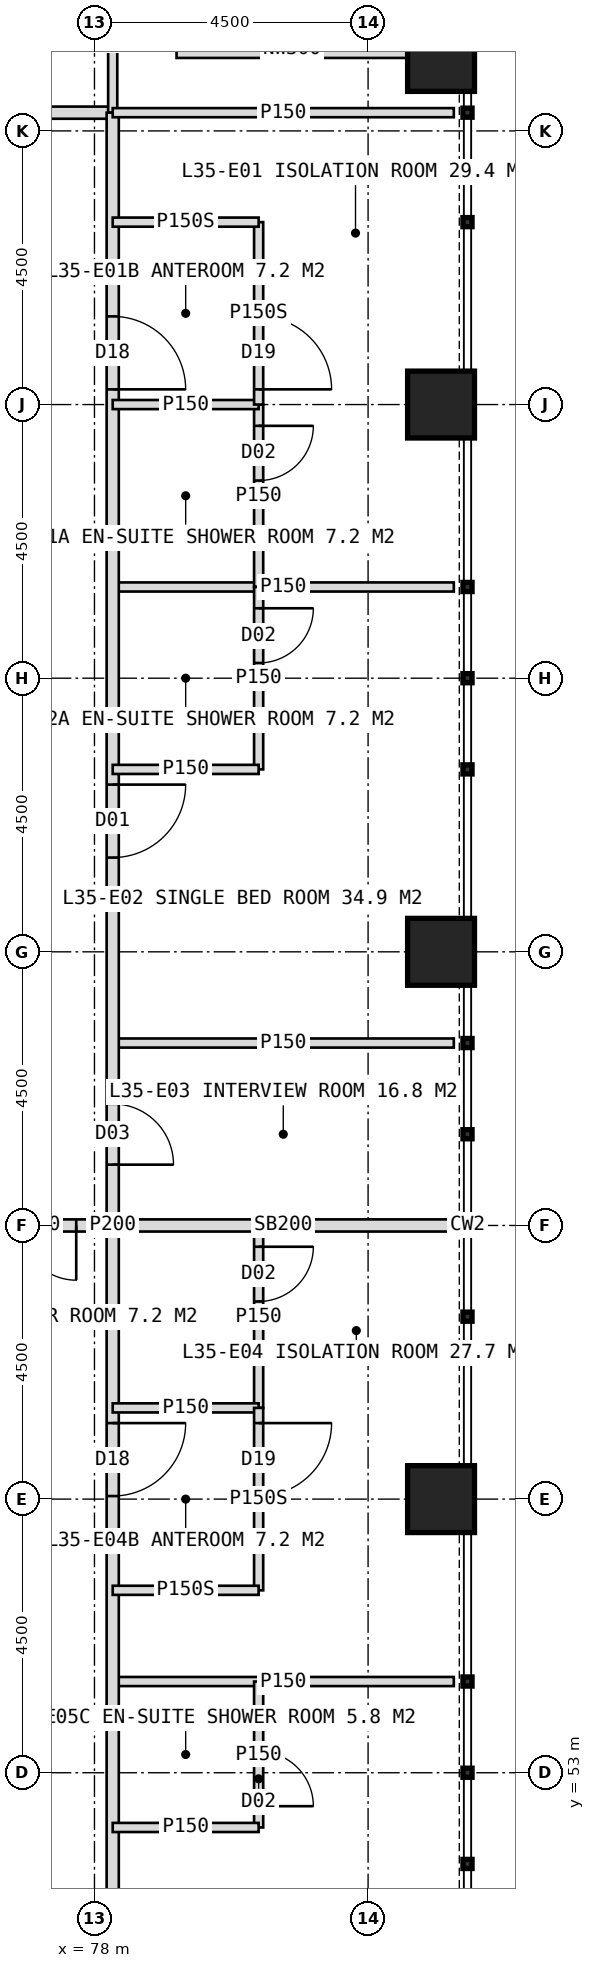
"""IFC4 building model, lengths in metres.
Left out: names, types, materials, properties, quantities, classifications, styles, units other than length and angle.
Written with IfcOpenShell. Run it as: python <this file> out.ifc"""

import sys

from ifc_helpers import new_model, si_unit, direction, frame, frame_2d, origin, origin_2d, place, context, subcontext, project, spatial, rectangle, hollow_rectangle, extrude, element, fill, save


model = new_model("IFC4")
c1 = context("Model", 3, precision=1e-05, world=origin(), true_north=direction((0.0, 1.0)))
c2 = subcontext(c1, "Body", "Model", "MODEL_VIEW")
j1 = project(units=[si_unit("LENGTHUNIT", "METRE"), si_unit("PLANEANGLEUNIT", "RADIAN")], contexts=[c1])
p1 = place(None, origin())
s1 = spatial("IfcSite", under=j1, at=p1, CompositionType="ELEMENT")
p2 = place(p1, origin())
s2 = spatial("IfcBuilding", under=s1, at=p2, CompositionType="ELEMENT")
p3 = place(p2, frame((0.0, 0.0, 148.0)))
s3 = spatial("IfcBuildingStorey", under=s2, at=p3, CompositionType="ELEMENT", Elevation=148.0)
for number, where, z_axis, x_axis in (
    (1, (83.7, 57.5, 0.0), (0.0, 0.0, 1.0), (1.0, 0.0, 0.0)),
    (2, (83.7, 66.5, 0.0), (0.0, 0.0, 1.0), (1.0, 0.0, 0.0)),
    (3, (83.7, 75.5, 0.0), (0.0, 0.0, 1.0), (1.0, 0.0, 0.0)),
    (4, (83.7, 81.2, 0.0), (0.0, 0.0, 1.0), (1.0, 0.0, 0.0)),
):
    element("IfcColumn", number, at=place(p3, frame(where, z_axis=z_axis, x_axis=x_axis)), inside=s3, PredefinedType="COLUMN", context=c2, shape_type="SweptSolid", body=[
        extrude(hollow_rectangle(XDim=1.1, YDim=1.1, WallThickness=0.1, at=origin_2d()), origin(), (0.0, 0.0, 1.0), 4.0),
    ])
p4 = place(p3, frame((79.35, 81.35, 0.0), z_axis=(0.0, 0.0, 1.0), x_axis=(1.0, 0.0, 0.0)))
e5 = element("IfcWall", 5, at=p4, inside=s3, PredefinedType="ELEMENTEDWALL", context=c2, shape_type="SweptSolid", body=[
    extrude(rectangle(XDim=3.8, YDim=0.3, at=frame_2d((1.9, 0.0))), origin(), (0.0, 0.0, 1.0), 4.0),
])
p5 = place(p3, frame((41.7, 80.3, 0.0), z_axis=(0.0, 0.0, 1.0), x_axis=(1.0, 0.0, 0.0)))
e6 = element("IfcWall", 6, at=p5, inside=s3, PredefinedType="PARTITIONING", context=c2, shape_type="SweptSolid", body=[
    extrude(rectangle(XDim=36.6, YDim=0.2, at=frame_2d((18.3, 0.0))), origin(), (0.0, 0.0, 1.0), 3.75),
])
p6 = place(p5, frame((3.35, 0.0, 0.0)))
e7 = element("IfcOpeningElement", 7, at=p6, cuts=e6, PredefinedType="OPENING", context=c2, shape_type="SweptSolid", body=[
    extrude(rectangle(XDim=1.2, YDim=2.2, at=frame_2d((0.6, 1.1))), frame((0.0, 0.11, 0.0), z_axis=(0.0, -1.0, 0.0), x_axis=(1.0, 0.0, 0.0)), (0.0, 0.0, 1.0), 0.22),
])
p7 = place(p5, frame((8.8, 0.0, 0.0)))
e8 = element("IfcOpeningElement", 8, at=p7, cuts=e6, PredefinedType="OPENING", context=c2, shape_type="SweptSolid", body=[
    extrude(rectangle(XDim=1.0, YDim=2.1, at=frame_2d((0.5, 1.05))), frame((0.0, 0.11, 0.0), z_axis=(0.0, -1.0, 0.0), x_axis=(1.0, 0.0, 0.0)), (0.0, 0.0, 1.0), 0.22),
])
p8 = place(p5, frame((15.35, 0.0, 0.0)))
e9 = element("IfcOpeningElement", 9, at=p8, cuts=e6, PredefinedType="OPENING", context=c2, shape_type="SweptSolid", body=[
    extrude(rectangle(XDim=1.2, YDim=2.2, at=frame_2d((0.6, 1.1))), frame((0.0, 0.11, 0.0), z_axis=(0.0, -1.0, 0.0), x_axis=(1.0, 0.0, 0.0)), (0.0, 0.0, 1.0), 0.22),
])
p9 = place(p5, frame((22.45, 0.0, 0.0)))
e10 = element("IfcOpeningElement", 10, at=p9, cuts=e6, PredefinedType="OPENING", context=c2, shape_type="SweptSolid", body=[
    extrude(rectangle(XDim=1.2, YDim=2.2, at=frame_2d((0.6, 1.1))), frame((0.0, 0.11, 0.0), z_axis=(0.0, -1.0, 0.0), x_axis=(1.0, 0.0, 0.0)), (0.0, 0.0, 1.0), 0.22),
])
p10 = place(p3, frame((78.3, 80.3, 0.0), z_axis=(0.0, 0.0, 1.0), x_axis=(0.0, 1.0, 0.0)))
e11 = element("IfcWall", 11, at=p10, inside=s3, PredefinedType="PARTITIONING", context=c2, shape_type="SweptSolid", body=[
    extrude(rectangle(XDim=2.4, YDim=0.15, at=frame_2d((1.2, 0.0))), origin(), (0.0, 0.0, 1.0), 3.75),
])
for number, where, z_axis, x_axis in (
    (12, (78.3, 72.5, 0.0), (0.0, 0.0, 1.0), (1.0, 0.0, 0.0)),
    (13, (78.3, 65.0, 0.0), (0.0, 0.0, 1.0), (1.0, 0.0, 0.0)),
):
    element("IfcWall", number, at=place(p3, frame(where, z_axis=z_axis, x_axis=x_axis)), inside=s3, PredefinedType="PARTITIONING", context=c2, shape_type="SweptSolid", body=[
        extrude(rectangle(XDim=5.61, YDim=0.15, at=frame_2d((2.805, 0.0))), origin(), (0.0, 0.0, 1.0), 3.75),
    ])
p11 = place(p3, frame((78.3, 62.0, 0.0), z_axis=(0.0, 0.0, 1.0), x_axis=(1.0, 0.0, 0.0)))
e14 = element("IfcWall", 14, at=p11, inside=s3, PredefinedType="SOLIDWALL", context=c2, shape_type="SweptSolid", body=[
    extrude(rectangle(XDim=5.61, YDim=0.2, at=frame_2d((2.805, 0.0))), origin(), (0.0, 0.0, 1.0), 2.95),
])
p12 = place(p3, frame((78.3, 54.5, 0.0), z_axis=(0.0, 0.0, 1.0), x_axis=(1.0, 0.0, 0.0)))
e15 = element("IfcWall", 15, at=p12, inside=s3, PredefinedType="PARTITIONING", context=c2, shape_type="SweptSolid", body=[
    extrude(rectangle(XDim=5.61, YDim=0.15, at=frame_2d((2.805, 0.0))), origin(), (0.0, 0.0, 1.0), 3.75),
])
p13 = place(p3, frame((78.3, 80.3, 0.0), z_axis=(0.0, 0.0, 1.0), x_axis=(0.0, -1.0, 0.0)))
e16 = element("IfcWall", 16, at=p13, inside=s3, PredefinedType="PARTITIONING", context=c2, shape_type="SweptSolid", body=[
    extrude(rectangle(XDim=36.6, YDim=0.2, at=frame_2d((18.3, 0.0))), origin(), (0.0, 0.0, 1.0), 3.75),
])
p14 = place(p13, frame((3.35, 0.0, 0.0)))
e17 = element("IfcOpeningElement", 17, at=p14, cuts=e16, PredefinedType="OPENING", context=c2, shape_type="SweptSolid", body=[
    extrude(rectangle(XDim=1.2, YDim=2.2, at=frame_2d((0.6, 1.1))), frame((0.0, 0.11, 0.0), z_axis=(0.0, -1.0, 0.0), x_axis=(1.0, 0.0, 0.0)), (0.0, 0.0, 1.0), 0.22),
])
p15 = place(p13, frame((11.05, 0.0, 0.0)))
e18 = element("IfcOpeningElement", 18, at=p15, cuts=e16, PredefinedType="OPENING", context=c2, shape_type="SweptSolid", body=[
    extrude(rectangle(XDim=1.2, YDim=2.2, at=frame_2d((0.6, 1.1))), frame((0.0, 0.11, 0.0), z_axis=(0.0, -1.0, 0.0), x_axis=(1.0, 0.0, 0.0)), (0.0, 0.0, 1.0), 0.22),
])
p16 = place(p13, frame((16.3, 0.0, 0.0)))
e19 = element("IfcOpeningElement", 19, at=p16, cuts=e16, PredefinedType="OPENING", context=c2, shape_type="SweptSolid", body=[
    extrude(rectangle(XDim=1.0, YDim=2.1, at=frame_2d((0.5, 1.05))), frame((0.0, 0.11, 0.0), z_axis=(0.0, -1.0, 0.0), x_axis=(1.0, 0.0, 0.0)), (0.0, 0.0, 1.0), 0.22),
])
p17 = place(p13, frame((21.55, 0.0, 0.0)))
e20 = element("IfcOpeningElement", 20, at=p17, cuts=e16, PredefinedType="OPENING", context=c2, shape_type="SweptSolid", body=[
    extrude(rectangle(XDim=1.2, YDim=2.2, at=frame_2d((0.6, 1.1))), frame((0.0, 0.11, 0.0), z_axis=(0.0, -1.0, 0.0), x_axis=(1.0, 0.0, 0.0)), (0.0, 0.0, 1.0), 0.22),
])
p18 = place(p13, frame((32.75, 0.0, 0.0)))
e21 = element("IfcOpeningElement", 21, at=p18, cuts=e16, PredefinedType="OPENING", context=c2, shape_type="SweptSolid", body=[
    extrude(rectangle(XDim=1.2, YDim=2.2, at=frame_2d((0.6, 1.1))), frame((0.0, 0.11, 0.0), z_axis=(0.0, -1.0, 0.0), x_axis=(1.0, 0.0, 0.0)), (0.0, 0.0, 1.0), 0.22),
])
p19 = place(p3, frame((78.3, 80.3, 0.0), z_axis=(0.0, 0.0, 1.0), x_axis=(1.0, 0.0, 0.0)))
e22 = element("IfcWall", 22, at=p19, inside=s3, PredefinedType="PARTITIONING", context=c2, shape_type="SweptSolid", body=[
    extrude(rectangle(XDim=5.61, YDim=0.15, at=frame_2d((2.805, 0.0))), origin(), (0.0, 0.0, 1.0), 3.75),
])
p20 = place(p3, frame((80.7, 75.5, 0.0), z_axis=(0.0, 0.0, 1.0), x_axis=(0.0, -1.0, 0.0)))
e23 = element("IfcWall", 23, at=p20, inside=s3, PredefinedType="PARTITIONING", context=c2, shape_type="SweptSolid", body=[
    extrude(rectangle(XDim=3.0, YDim=0.15, at=frame_2d((1.5, 0.0))), origin(), (0.0, 0.0, 1.0), 3.75),
])
p21 = place(p20, frame((0.35, 0.0, 0.0)))
e24 = element("IfcOpeningElement", 24, at=p21, cuts=e23, PredefinedType="OPENING", context=c2, shape_type="SweptSolid", body=[
    extrude(rectangle(XDim=0.9, YDim=2.1, at=frame_2d((0.45, 1.05))), frame((0.0, 0.085, 0.0), z_axis=(0.0, -1.0, 0.0), x_axis=(1.0, 0.0, 0.0)), (0.0, 0.0, 1.0), 0.17),
])
p22 = place(p3, frame((78.3, 75.5, 0.0), z_axis=(0.0, 0.0, 1.0), x_axis=(1.0, 0.0, 0.0)))
e25 = element("IfcWall", 25, at=p22, inside=s3, PredefinedType="PARTITIONING", context=c2, shape_type="SweptSolid", body=[
    extrude(rectangle(XDim=2.4, YDim=0.15, at=frame_2d((1.2, 0.0))), origin(), (0.0, 0.0, 1.0), 2.95),
])
p23 = place(p3, frame((80.7, 78.5, 0.0), z_axis=(0.0, 0.0, 1.0), x_axis=(0.0, -1.0, 0.0)))
e26 = element("IfcWall", 26, at=p23, inside=s3, PredefinedType="PARTITIONING", context=c2, shape_type="SweptSolid", body=[
    extrude(rectangle(XDim=3.0, YDim=0.15, at=frame_2d((1.5, 0.0))), origin(), (0.0, 0.0, 1.0), 3.75),
])
p24 = place(p23, frame((1.55, 0.0, 0.0)))
e27 = element("IfcOpeningElement", 27, at=p24, cuts=e26, PredefinedType="OPENING", context=c2, shape_type="SweptSolid", body=[
    extrude(rectangle(XDim=1.2, YDim=2.2, at=frame_2d((0.6, 1.1))), frame((0.0, 0.085, 0.0), z_axis=(0.0, -1.0, 0.0), x_axis=(1.0, 0.0, 0.0)), (0.0, 0.0, 1.0), 0.17),
])
p25 = place(p3, frame((78.3, 78.5, 0.0), z_axis=(0.0, 0.0, 1.0), x_axis=(1.0, 0.0, 0.0)))
e28 = element("IfcWall", 28, at=p25, inside=s3, PredefinedType="PARTITIONING", context=c2, shape_type="SweptSolid", body=[
    extrude(rectangle(XDim=2.4, YDim=0.15, at=frame_2d((1.2, 0.0))), origin(), (0.0, 0.0, 1.0), 3.75),
])
p26 = place(p3, frame((80.7, 72.5, 0.0), z_axis=(0.0, 0.0, 1.0), x_axis=(0.0, -1.0, 0.0)))
e29 = element("IfcWall", 29, at=p26, inside=s3, PredefinedType="PARTITIONING", context=c2, shape_type="SweptSolid", body=[
    extrude(rectangle(XDim=3.0, YDim=0.15, at=frame_2d((1.5, 0.0))), origin(), (0.0, 0.0, 1.0), 3.75),
])
p27 = place(p26, frame((0.35, 0.0, 0.0)))
e30 = element("IfcOpeningElement", 30, at=p27, cuts=e29, PredefinedType="OPENING", context=c2, shape_type="SweptSolid", body=[
    extrude(rectangle(XDim=0.9, YDim=2.1, at=frame_2d((0.45, 1.05))), frame((0.0, 0.085, 0.0), z_axis=(0.0, -1.0, 0.0), x_axis=(1.0, 0.0, 0.0)), (0.0, 0.0, 1.0), 0.17),
])
p28 = place(p3, frame((78.3, 69.5, 0.0), z_axis=(0.0, 0.0, 1.0), x_axis=(1.0, 0.0, 0.0)))
e31 = element("IfcWall", 31, at=p28, inside=s3, PredefinedType="PARTITIONING", context=c2, shape_type="SweptSolid", body=[
    extrude(rectangle(XDim=2.4, YDim=0.15, at=frame_2d((1.2, 0.0))), origin(), (0.0, 0.0, 1.0), 3.75),
])
p29 = place(p3, frame((80.7, 62.0, 0.0), z_axis=(0.0, 0.0, 1.0), x_axis=(0.0, -1.0, 0.0)))
e32 = element("IfcWall", 32, at=p29, inside=s3, PredefinedType="PARTITIONING", context=c2, shape_type="SweptSolid", body=[
    extrude(rectangle(XDim=3.0, YDim=0.15, at=frame_2d((1.5, 0.0))), origin(), (0.0, 0.0, 1.0), 3.75),
])
p30 = place(p29, frame((0.35, 0.0, 0.0)))
e33 = element("IfcOpeningElement", 33, at=p30, cuts=e32, PredefinedType="OPENING", context=c2, shape_type="SweptSolid", body=[
    extrude(rectangle(XDim=0.9, YDim=2.1, at=frame_2d((0.45, 1.05))), frame((0.0, 0.085, 0.0), z_axis=(0.0, -1.0, 0.0), x_axis=(1.0, 0.0, 0.0)), (0.0, 0.0, 1.0), 0.17),
])
p31 = place(p3, frame((78.3, 59.0, 0.0), z_axis=(0.0, 0.0, 1.0), x_axis=(1.0, 0.0, 0.0)))
e34 = element("IfcWall", 34, at=p31, inside=s3, PredefinedType="PARTITIONING", context=c2, shape_type="SweptSolid", body=[
    extrude(rectangle(XDim=2.4, YDim=0.15, at=frame_2d((1.2, 0.0))), origin(), (0.0, 0.0, 1.0), 3.75),
])
p32 = place(p3, frame((80.7, 59.0, 0.0), z_axis=(0.0, 0.0, 1.0), x_axis=(0.0, -1.0, 0.0)))
e35 = element("IfcWall", 35, at=p32, inside=s3, PredefinedType="PARTITIONING", context=c2, shape_type="SweptSolid", body=[
    extrude(rectangle(XDim=3.0, YDim=0.15, at=frame_2d((1.5, 0.0))), origin(), (0.0, 0.0, 1.0), 3.75),
])
p33 = place(p32, frame((0.25, 0.0, 0.0)))
e36 = element("IfcOpeningElement", 36, at=p33, cuts=e35, PredefinedType="OPENING", context=c2, shape_type="SweptSolid", body=[
    extrude(rectangle(XDim=1.2, YDim=2.2, at=frame_2d((0.6, 1.1))), frame((0.0, 0.085, 0.0), z_axis=(0.0, -1.0, 0.0), x_axis=(1.0, 0.0, 0.0)), (0.0, 0.0, 1.0), 0.17),
])
p34 = place(p3, frame((78.3, 56.0, 0.0), z_axis=(0.0, 0.0, 1.0), x_axis=(1.0, 0.0, 0.0)))
e37 = element("IfcWall", 37, at=p34, inside=s3, PredefinedType="PARTITIONING", context=c2, shape_type="SweptSolid", body=[
    extrude(rectangle(XDim=2.4, YDim=0.15, at=frame_2d((1.2, 0.0))), origin(), (0.0, 0.0, 1.0), 3.75),
])
p35 = place(p3, frame((80.7, 54.5, 0.0), z_axis=(0.0, 0.0, 1.0), x_axis=(0.0, -1.0, 0.0)))
e38 = element("IfcWall", 38, at=p35, inside=s3, PredefinedType="PARTITIONING", context=c2, shape_type="SweptSolid", body=[
    extrude(rectangle(XDim=2.4, YDim=0.15, at=frame_2d((1.2, 0.0))), origin(), (0.0, 0.0, 1.0), 3.75),
])
p36 = place(p35, frame((1.15, 0.0, 0.0)))
e39 = element("IfcOpeningElement", 39, at=p36, cuts=e38, PredefinedType="OPENING", context=c2, shape_type="SweptSolid", body=[
    extrude(rectangle(XDim=0.9, YDim=2.1, at=frame_2d((0.45, 1.05))), frame((0.0, 0.085, 0.0), z_axis=(0.0, -1.0, 0.0), x_axis=(1.0, 0.0, 0.0)), (0.0, 0.0, 1.0), 0.17),
])
p37 = place(p3, frame((78.3, 52.1, 0.0), z_axis=(0.0, 0.0, 1.0), x_axis=(1.0, 0.0, 0.0)))
e40 = element("IfcWall", 40, at=p37, inside=s3, PredefinedType="PARTITIONING", context=c2, shape_type="SweptSolid", body=[
    extrude(rectangle(XDim=2.4, YDim=0.15, at=frame_2d((1.2, 0.0))), origin(), (0.0, 0.0, 1.0), 3.75),
])
p38 = place(p3, frame((75.6, 62.0, 0.0), z_axis=(0.0, 0.0, 1.0), x_axis=(1.0, 0.0, 0.0)))
e41 = element("IfcWall", 41, at=p38, inside=s3, PredefinedType="SOLIDWALL", context=c2, shape_type="SweptSolid", body=[
    extrude(rectangle(XDim=2.7, YDim=0.2, at=frame_2d((1.35, 0.0))), origin(), (0.0, 0.0, 1.0), 2.95),
])
p39 = place(p38, frame((0.3, 0.0, 0.0)))
e42 = element("IfcOpeningElement", 42, at=p39, cuts=e41, PredefinedType="OPENING", context=c2, shape_type="SweptSolid", body=[
    extrude(rectangle(XDim=1.8, YDim=2.2, at=frame_2d((0.9, 1.1))), frame((0.0, 0.11, 0.0), z_axis=(0.0, -1.0, 0.0), x_axis=(1.0, 0.0, 0.0)), (0.0, 0.0, 1.0), 0.22),
])
p40 = place(p24, origin())
e43 = element("IfcDoor", 43, at=p40, inside=s3, OperationType="SINGLE_SWING_RIGHT", PredefinedType="DOOR", context=c2, shape_type="SweptSolid", body=[
    extrude(rectangle(XDim=1.2, YDim=2.2, at=frame_2d((0.6, 1.1))), frame((0.0, 0.025, 0.0), z_axis=(0.0, -1.0, 0.0), x_axis=(1.0, 0.0, 0.0)), (0.0, 0.0, 1.0), 0.05),
])
fill(e27, e43)
p41 = place(p14, origin())
e44 = element("IfcDoor", 44, at=p41, inside=s3, OperationType="SINGLE_SWING_RIGHT", PredefinedType="DOOR", context=c2, shape_type="SweptSolid", body=[
    extrude(rectangle(XDim=1.2, YDim=2.2, at=frame_2d((0.6, 1.1))), frame((0.0, 0.025, 0.0), z_axis=(0.0, -1.0, 0.0), x_axis=(1.0, 0.0, 0.0)), (0.0, 0.0, 1.0), 0.05),
])
fill(e17, e44)
p42 = place(p21, origin())
e45 = element("IfcDoor", 45, at=p42, inside=s3, OperationType="SINGLE_SWING_LEFT", PredefinedType="DOOR", context=c2, shape_type="SweptSolid", body=[
    extrude(rectangle(XDim=0.9, YDim=2.1, at=frame_2d((0.45, 1.05))), frame((0.0, 0.025, 0.0), z_axis=(0.0, -1.0, 0.0), x_axis=(1.0, 0.0, 0.0)), (0.0, 0.0, 1.0), 0.05),
])
fill(e24, e45)
p43 = place(p15, origin())
e46 = element("IfcDoor", 46, at=p43, inside=s3, OperationType="SINGLE_SWING_LEFT", PredefinedType="DOOR", context=c2, shape_type="SweptSolid", body=[
    extrude(rectangle(XDim=1.2, YDim=2.2, at=frame_2d((0.6, 1.1))), frame((0.0, 0.025, 0.0), z_axis=(0.0, -1.0, 0.0), x_axis=(1.0, 0.0, 0.0)), (0.0, 0.0, 1.0), 0.05),
])
fill(e18, e46)
p44 = place(p27, origin())
e47 = element("IfcDoor", 47, at=p44, inside=s3, OperationType="SINGLE_SWING_LEFT", PredefinedType="DOOR", context=c2, shape_type="SweptSolid", body=[
    extrude(rectangle(XDim=0.9, YDim=2.1, at=frame_2d((0.45, 1.05))), frame((0.0, 0.025, 0.0), z_axis=(0.0, -1.0, 0.0), x_axis=(1.0, 0.0, 0.0)), (0.0, 0.0, 1.0), 0.05),
])
fill(e30, e47)
p45 = place(p16, origin())
e48 = element("IfcDoor", 48, at=p45, inside=s3, OperationType="SINGLE_SWING_RIGHT", PredefinedType="DOOR", context=c2, shape_type="SweptSolid", body=[
    extrude(rectangle(XDim=1.0, YDim=2.1, at=frame_2d((0.5, 1.05))), frame((0.0, 0.025, 0.0), z_axis=(0.0, -1.0, 0.0), x_axis=(1.0, 0.0, 0.0)), (0.0, 0.0, 1.0), 0.05),
])
fill(e19, e48)
p46 = place(p33, origin())
e49 = element("IfcDoor", 49, at=p46, inside=s3, OperationType="SINGLE_SWING_LEFT", PredefinedType="DOOR", context=c2, shape_type="SweptSolid", body=[
    extrude(rectangle(XDim=1.2, YDim=2.2, at=frame_2d((0.6, 1.1))), frame((0.0, 0.025, 0.0), z_axis=(0.0, -1.0, 0.0), x_axis=(1.0, 0.0, 0.0)), (0.0, 0.0, 1.0), 0.05),
])
fill(e36, e49)
p47 = place(p17, origin())
e50 = element("IfcDoor", 50, at=p47, inside=s3, OperationType="SINGLE_SWING_LEFT", PredefinedType="DOOR", context=c2, shape_type="SweptSolid", body=[
    extrude(rectangle(XDim=1.2, YDim=2.2, at=frame_2d((0.6, 1.1))), frame((0.0, 0.025, 0.0), z_axis=(0.0, -1.0, 0.0), x_axis=(1.0, 0.0, 0.0)), (0.0, 0.0, 1.0), 0.05),
])
fill(e20, e50)
p48 = place(p30, origin())
e51 = element("IfcDoor", 51, at=p48, inside=s3, OperationType="SINGLE_SWING_LEFT", PredefinedType="DOOR", context=c2, shape_type="SweptSolid", body=[
    extrude(rectangle(XDim=0.9, YDim=2.1, at=frame_2d((0.45, 1.05))), frame((0.0, 0.025, 0.0), z_axis=(0.0, -1.0, 0.0), x_axis=(1.0, 0.0, 0.0)), (0.0, 0.0, 1.0), 0.05),
])
fill(e33, e51)
p49 = place(p36, origin())
e52 = element("IfcDoor", 52, at=p49, inside=s3, OperationType="SINGLE_SWING_RIGHT", PredefinedType="DOOR", context=c2, shape_type="SweptSolid", body=[
    extrude(rectangle(XDim=0.9, YDim=2.1, at=frame_2d((0.45, 1.05))), frame((0.0, 0.025, 0.0), z_axis=(0.0, -1.0, 0.0), x_axis=(1.0, 0.0, 0.0)), (0.0, 0.0, 1.0), 0.05),
])
fill(e39, e52)
p50 = place(p39, origin())
e53 = element("IfcDoor", 53, at=p50, inside=s3, OperationType="DOUBLE_DOOR_DOUBLE_SWING", PredefinedType="DOOR", context=c2, shape_type="SweptSolid", body=[
    extrude(rectangle(XDim=1.8, YDim=2.2, at=frame_2d((0.9, 1.1))), frame((0.0, 0.025, 0.0), z_axis=(0.0, -1.0, 0.0), x_axis=(1.0, 0.0, 0.0)), (0.0, 0.0, 1.0), 0.05),
])
fill(e42, e53)
save(model, sys.argv[1])
